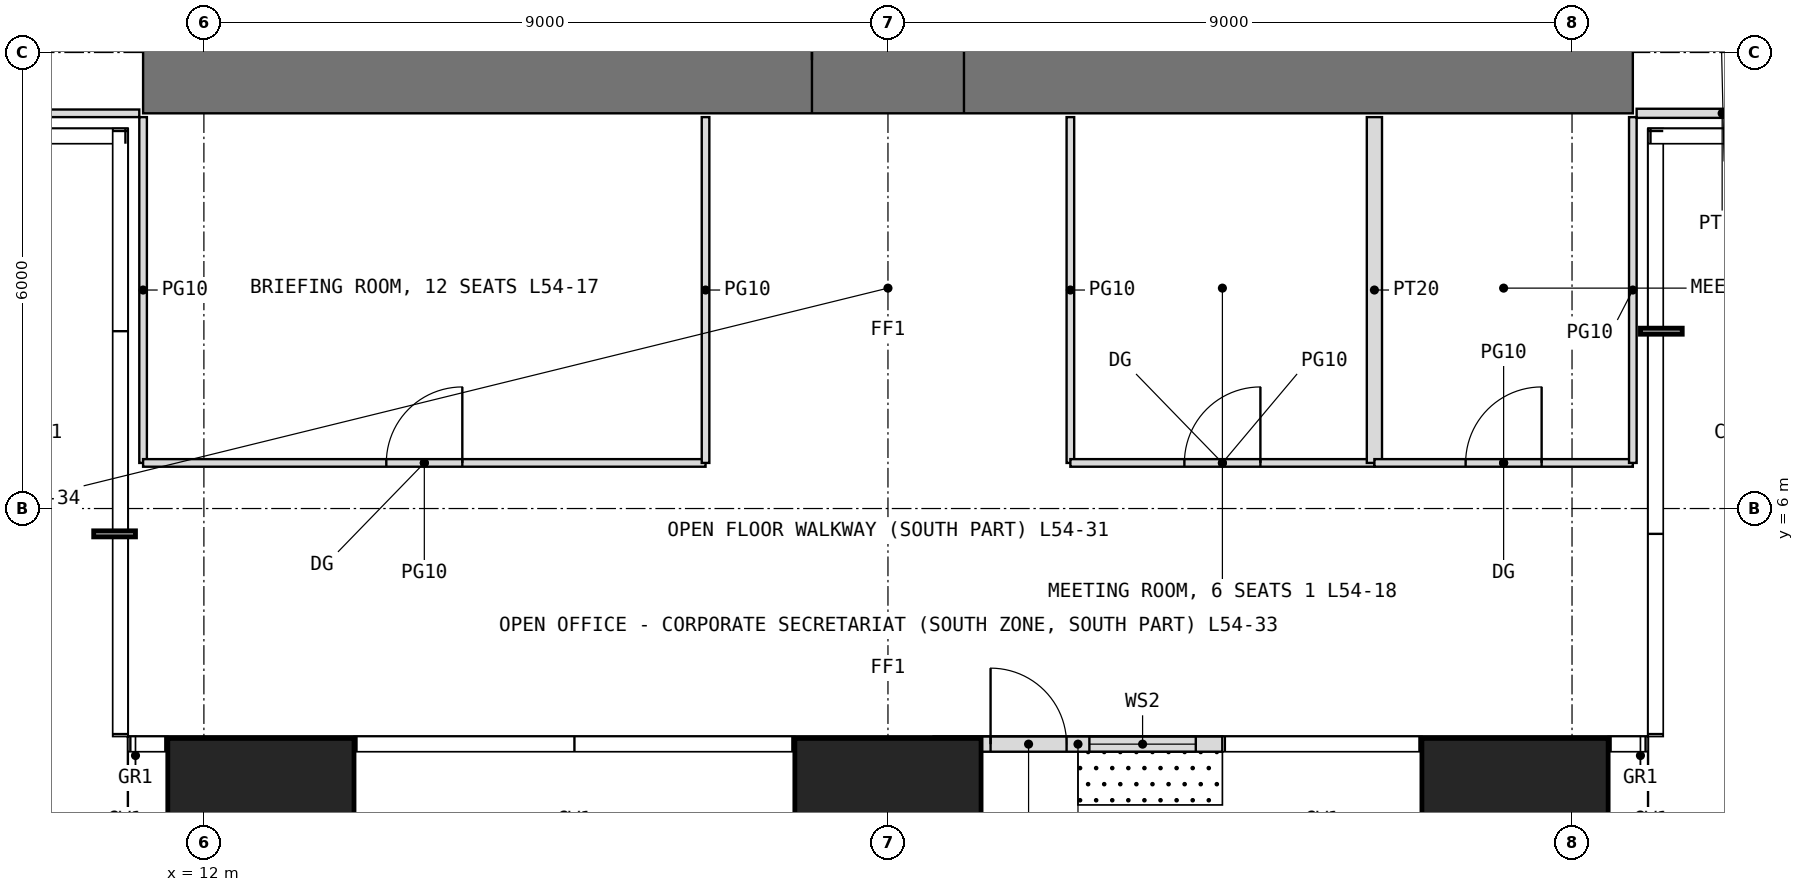
"""IFC4 building model, lengths in metres.
Left out: names, types, materials, properties, quantities, classifications, styles, units other than length and angle.
Written with IfcOpenShell. Run it as: python <this file> out.ifc"""

import sys

from ifc_helpers import new_model, si_unit, direction, frame, frame_2d, origin, origin_2d, place, context, subcontext, project, spatial, rectangle, extrude, element, fill, save


model = new_model("IFC4")
c1 = context("Model", 3, precision=1e-05, world=origin(), true_north=direction((0.0, 1.0)))
c2 = subcontext(c1, "Body", "Model", "MODEL_VIEW")
j1 = project(units=[si_unit("LENGTHUNIT", "METRE"), si_unit("PLANEANGLEUNIT", "RADIAN")], contexts=[c1])
p1 = place(None, origin())
s1 = spatial("IfcSite", under=j1, at=p1, CompositionType="ELEMENT")
p2 = place(p1, origin())
s2 = spatial("IfcBuilding", under=s1, at=p2, CompositionType="ELEMENT")
p3 = place(p2, frame((0.0, 0.0, 226.5)))
s3 = spatial("IfcBuildingStorey", under=s2, at=p3, CompositionType="ELEMENT", Elevation=226.5)
for number, where, z_axis, x_axis in (
    (1, (12.75, 1.75, 0.0), (0.0, 0.0, 1.0), (1.0, 0.0, 0.0)),
    (2, (21.0, 1.75, 0.0), (0.0, 0.0, 1.0), (1.0, 0.0, 0.0)),
    (3, (29.25, 1.75, 0.0), (0.0, 0.0, 1.0), (1.0, 0.0, 0.0)),
):
    element("IfcColumn", number, at=place(p3, frame(where, z_axis=z_axis, x_axis=x_axis)), inside=s3, PredefinedType="COLUMN", context=c2, shape_type="SweptSolid", body=[
        extrude(rectangle(XDim=2.45, YDim=2.45, at=origin_2d()), origin(), (0.0, 0.0, 1.0), 4.0),
    ])
p4 = place(p3, frame((21.6, 2.9, 0.0), z_axis=(0.0, 0.0, 1.0), x_axis=(1.0, 0.0, 0.0)))
e4 = element("IfcWall", 4, at=p4, inside=s3, PredefinedType="USERDEFINED", context=c2, shape_type="SweptSolid", body=[
    extrude(rectangle(XDim=3.8, YDim=0.2, at=frame_2d((1.9, 0.0))), origin(), (0.0, 0.0, 1.0), 3.75),
])
p5 = place(p4, frame((0.75, 0.0, 0.0)))
e5 = element("IfcOpeningElement", 5, at=p5, cuts=e4, PredefinedType="OPENING", context=c2, shape_type="SweptSolid", body=[
    extrude(rectangle(XDim=1.0, YDim=2.4, at=frame_2d((0.5, 1.2))), frame((0.0, 0.11, 0.0), z_axis=(0.0, -1.0, 0.0), x_axis=(1.0, 0.0, 0.0)), (0.0, 0.0, 1.0), 0.22),
])
p6 = place(p4, frame((2.05, 0.0, 0.3)))
e6 = element("IfcOpeningElement", 6, at=p6, cuts=e4, PredefinedType="OPENING", context=c2, shape_type="SweptSolid", body=[
    extrude(rectangle(XDim=1.4, YDim=2.7, at=frame_2d((0.7, 1.35))), frame((0.0, 0.11, 0.0), z_axis=(0.0, -1.0, 0.0), x_axis=(1.0, 0.0, 0.0)), (0.0, 0.0, 1.0), 0.22),
])
p7 = place(p3, frame((11.2, 11.9, -0.05), z_axis=(0.0, 0.0, 1.0), x_axis=(1.0, 0.0, 0.0)))
e7 = element("IfcWall", 7, at=p7, inside=s3, PredefinedType="SHEAR", context=c2, shape_type="SweptSolid", body=[
    extrude(rectangle(XDim=19.6, YDim=1.4, at=frame_2d((9.8, 0.0))), origin(), (0.0, 0.0, 1.0), 4.0),
])
p8 = place(p7, frame((8.8, 0.0, 0.05)))
e8 = element("IfcOpeningElement", 8, at=p8, cuts=e7, PredefinedType="OPENING", context=c2, shape_type="SweptSolid", body=[
    extrude(rectangle(XDim=2.0, YDim=2.2, at=frame_2d((1.0, 1.1))), frame((0.0, 0.71, 0.0), z_axis=(0.0, -1.0, 0.0), x_axis=(1.0, 0.0, 0.0)), (0.0, 0.0, 1.0), 1.42),
])
p9 = place(p3, frame((8.2, 11.2, 0.0), z_axis=(0.0, 0.0, 1.0), x_axis=(1.0, 0.0, 0.0)))
e9 = element("IfcWall", 9, at=p9, inside=s3, PredefinedType="PARTITIONING", context=c2, shape_type="SweptSolid", body=[
    extrude(rectangle(XDim=2.95, YDim=0.1, at=frame_2d((1.475, 0.0))), origin(), (0.0, 0.0, 1.0), 3.75),
])
p10 = place(p3, frame((11.2, 6.6, 0.0), z_axis=(0.0, 0.0, 1.0), x_axis=(0.0, 1.0, 0.0)))
e10 = element("IfcWall", 10, at=p10, inside=s3, PredefinedType="PARTITIONING", context=c2, shape_type="SweptSolid", body=[
    extrude(rectangle(XDim=4.55, YDim=0.1, at=frame_2d((2.275, 0.0))), origin(), (0.0, 0.0, 1.0), 3.75),
])
p11 = place(p3, frame((11.2, 6.6, 0.0), z_axis=(0.0, 0.0, 1.0), x_axis=(1.0, 0.0, 0.0)))
e11 = element("IfcWall", 11, at=p11, inside=s3, PredefinedType="PARTITIONING", context=c2, shape_type="SweptSolid", body=[
    extrude(rectangle(XDim=7.4, YDim=0.1, at=frame_2d((3.7, 0.0))), origin(), (0.0, 0.0, 1.0), 3.75),
])
p12 = place(p11, frame((3.2, 0.0, 0.0)))
e12 = element("IfcOpeningElement", 12, at=p12, cuts=e11, PredefinedType="OPENING", context=c2, shape_type="SweptSolid", body=[
    extrude(rectangle(XDim=1.0, YDim=2.4, at=frame_2d((0.5, 1.2))), frame((0.0, 0.06, 0.0), z_axis=(0.0, -1.0, 0.0), x_axis=(1.0, 0.0, 0.0)), (0.0, 0.0, 1.0), 0.12),
])
for number, where, z_axis, x_axis in (
    (13, (18.6, 6.6, 0.0), (0.0, 0.0, 1.0), (0.0, 1.0, 0.0)),
    (14, (23.4, 6.6, 0.0), (0.0, 0.0, 1.0), (0.0, 1.0, 0.0)),
):
    element("IfcWall", number, at=place(p3, frame(where, z_axis=z_axis, x_axis=x_axis)), inside=s3, PredefinedType="PARTITIONING", context=c2, shape_type="SweptSolid", body=[
        extrude(rectangle(XDim=4.55, YDim=0.1, at=frame_2d((2.275, 0.0))), origin(), (0.0, 0.0, 1.0), 3.75),
    ])
p13 = place(p3, frame((23.4, 6.6, 0.0), z_axis=(0.0, 0.0, 1.0), x_axis=(1.0, 0.0, 0.0)))
e15 = element("IfcWall", 15, at=p13, inside=s3, PredefinedType="PARTITIONING", context=c2, shape_type="SweptSolid", body=[
    extrude(rectangle(XDim=4.0, YDim=0.1, at=frame_2d((2.0, 0.0))), origin(), (0.0, 0.0, 1.0), 3.75),
])
p14 = place(p13, frame((1.5, 0.0, 0.0)))
e16 = element("IfcOpeningElement", 16, at=p14, cuts=e15, PredefinedType="OPENING", context=c2, shape_type="SweptSolid", body=[
    extrude(rectangle(XDim=1.0, YDim=2.4, at=frame_2d((0.5, 1.2))), frame((0.0, 0.06, 0.0), z_axis=(0.0, -1.0, 0.0), x_axis=(1.0, 0.0, 0.0)), (0.0, 0.0, 1.0), 0.12),
])
p15 = place(p3, frame((27.4, 6.6, 0.0), z_axis=(0.0, 0.0, 1.0), x_axis=(0.0, 1.0, 0.0)))
e17 = element("IfcWall", 17, at=p15, inside=s3, PredefinedType="PARTITIONING", context=c2, shape_type="SweptSolid", body=[
    extrude(rectangle(XDim=4.55, YDim=0.2, at=frame_2d((2.275, 0.0))), origin(), (0.0, 0.0, 1.0), 3.75),
])
p16 = place(p3, frame((27.4, 6.6, 0.0), z_axis=(0.0, 0.0, 1.0), x_axis=(1.0, 0.0, 0.0)))
e18 = element("IfcWall", 18, at=p16, inside=s3, PredefinedType="PARTITIONING", context=c2, shape_type="SweptSolid", body=[
    extrude(rectangle(XDim=3.4, YDim=0.1, at=frame_2d((1.7, 0.0))), origin(), (0.0, 0.0, 1.0), 3.75),
])
p17 = place(p16, frame((1.2, 0.0, 0.0)))
e19 = element("IfcOpeningElement", 19, at=p17, cuts=e18, PredefinedType="OPENING", context=c2, shape_type="SweptSolid", body=[
    extrude(rectangle(XDim=1.0, YDim=2.4, at=frame_2d((0.5, 1.2))), frame((0.0, 0.06, 0.0), z_axis=(0.0, -1.0, 0.0), x_axis=(1.0, 0.0, 0.0)), (0.0, 0.0, 1.0), 0.12),
])
p18 = place(p3, frame((30.8, 6.6, 0.0), z_axis=(0.0, 0.0, 1.0), x_axis=(0.0, 1.0, 0.0)))
e20 = element("IfcWall", 20, at=p18, inside=s3, PredefinedType="PARTITIONING", context=c2, shape_type="SweptSolid", body=[
    extrude(rectangle(XDim=4.55, YDim=0.1, at=frame_2d((2.275, 0.0))), origin(), (0.0, 0.0, 1.0), 3.75),
])
p19 = place(p3, frame((30.85, 11.2, 0.0), z_axis=(0.0, 0.0, 1.0), x_axis=(1.0, 0.0, 0.0)))
e21 = element("IfcWall", 21, at=p19, inside=s3, PredefinedType="PARTITIONING", context=c2, shape_type="SweptSolid", body=[
    extrude(rectangle(XDim=2.25, YDim=0.12, at=frame_2d((1.125, 0.0))), origin(), (0.0, 0.0, 1.0), 3.75),
])
p20 = place(p5, origin())
e22 = element("IfcDoor", 22, at=p20, inside=s3, OperationType="SINGLE_SWING_LEFT", PredefinedType="DOOR", context=c2, shape_type="SweptSolid", body=[
    extrude(rectangle(XDim=1.0, YDim=2.4, at=frame_2d((0.5, 1.2))), frame((0.0, 0.025, 0.0), z_axis=(0.0, -1.0, 0.0), x_axis=(1.0, 0.0, 0.0)), (0.0, 0.0, 1.0), 0.05),
])
fill(e5, e22)
p21 = place(p6, origin())
e23 = element("IfcWindow", 23, at=p21, inside=s3, PartitioningType="SINGLE_PANEL", PredefinedType="WINDOW", context=c2, shape_type="SweptSolid", body=[
    extrude(rectangle(XDim=1.4, YDim=2.7, at=frame_2d((0.7, 1.35))), frame((0.0, 0.03, 0.0), z_axis=(0.0, -1.0, 0.0), x_axis=(1.0, 0.0, 0.0)), (0.0, 0.0, 1.0), 0.06),
])
fill(e6, e23)
p22 = place(p8, origin())
e24 = element("IfcDoor", 24, at=p22, inside=s3, OperationType="DOUBLE_DOOR_SINGLE_SWING", PredefinedType="DOOR", context=c2, shape_type="SweptSolid", body=[
    extrude(rectangle(XDim=2.0, YDim=2.2, at=frame_2d((1.0, 1.1))), frame((0.0, 0.025, 0.0), z_axis=(0.0, -1.0, 0.0), x_axis=(1.0, 0.0, 0.0)), (0.0, 0.0, 1.0), 0.05),
])
fill(e8, e24)
p23 = place(p12, origin())
e25 = element("IfcDoor", 25, at=p23, inside=s3, OperationType="SINGLE_SWING_RIGHT", PredefinedType="DOOR", context=c2, shape_type="SweptSolid", body=[
    extrude(rectangle(XDim=1.0, YDim=2.4, at=frame_2d((0.5, 1.2))), frame((0.0, 0.025, 0.0), z_axis=(0.0, -1.0, 0.0), x_axis=(1.0, 0.0, 0.0)), (0.0, 0.0, 1.0), 0.05),
])
fill(e12, e25)
p24 = place(p14, origin())
e26 = element("IfcDoor", 26, at=p24, inside=s3, OperationType="SINGLE_SWING_RIGHT", PredefinedType="DOOR", context=c2, shape_type="SweptSolid", body=[
    extrude(rectangle(XDim=1.0, YDim=2.4, at=frame_2d((0.5, 1.2))), frame((0.0, 0.025, 0.0), z_axis=(0.0, -1.0, 0.0), x_axis=(1.0, 0.0, 0.0)), (0.0, 0.0, 1.0), 0.05),
])
fill(e16, e26)
p25 = place(p17, origin())
e27 = element("IfcDoor", 27, at=p25, inside=s3, OperationType="SINGLE_SWING_RIGHT", PredefinedType="DOOR", context=c2, shape_type="SweptSolid", body=[
    extrude(rectangle(XDim=1.0, YDim=2.4, at=frame_2d((0.5, 1.2))), frame((0.0, 0.025, 0.0), z_axis=(0.0, -1.0, 0.0), x_axis=(1.0, 0.0, 0.0)), (0.0, 0.0, 1.0), 0.05),
])
fill(e19, e27)
save(model, sys.argv[1])
